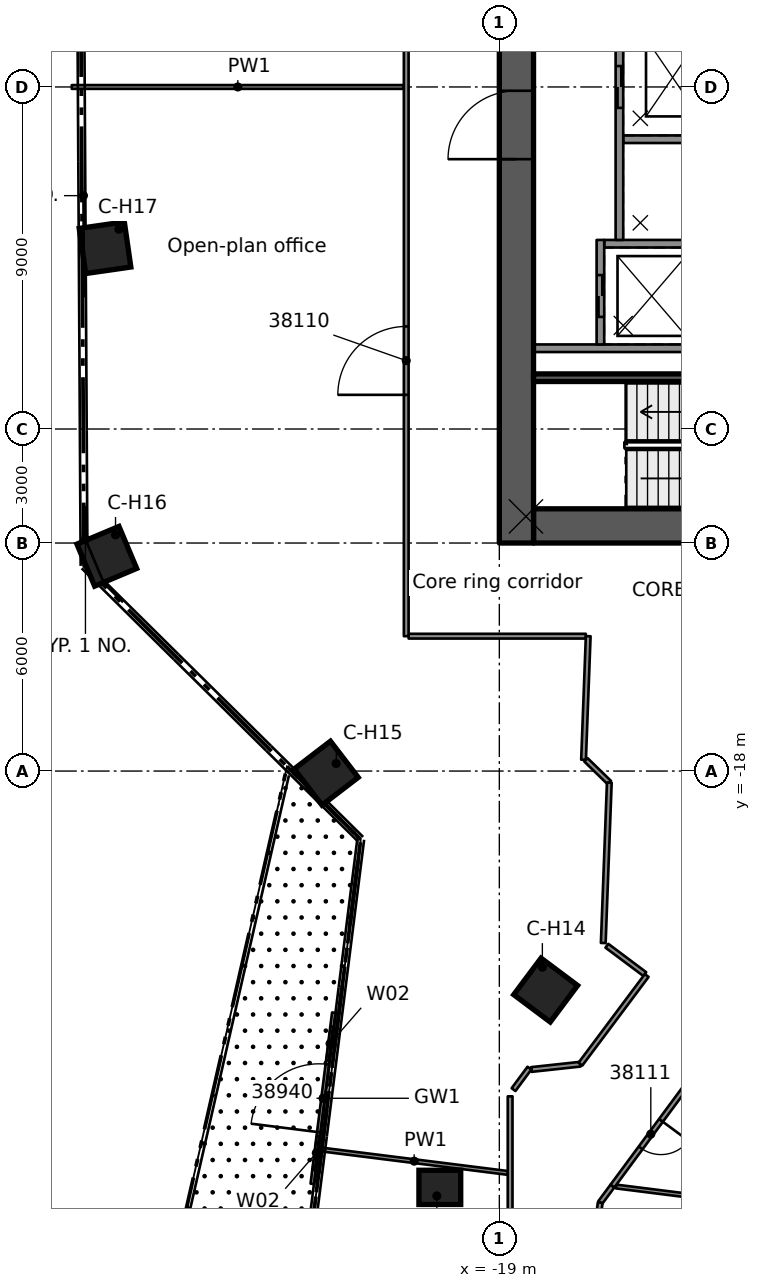
"""IFC4 building model, lengths in metres.
Left out: names, types, materials, properties, quantities, classifications, styles, units other than length and angle.
Written with IfcOpenShell. Run it as: python <this file> out.ifc"""

import sys

from ifc_helpers import new_model, si_unit, direction, frame, frame_2d, origin, origin_2d, place, context, subcontext, project, spatial, rectangle, extrude, element, fill, save


model = new_model("IFC4")
c1 = context("Model", 3, precision=1e-05, world=origin(), true_north=direction((0.0, 1.0)))
c2 = subcontext(c1, "Body", "Model", "MODEL_VIEW")
j1 = project(units=[si_unit("LENGTHUNIT", "METRE"), si_unit("PLANEANGLEUNIT", "RADIAN")], contexts=[c1])
p1 = place(None, origin())
s1 = spatial("IfcSite", under=j1, at=p1, CompositionType="ELEMENT")
p2 = place(p1, origin())
s2 = spatial("IfcBuilding", under=s1, at=p2, CompositionType="ELEMENT")
p3 = place(p2, frame((0.0, 0.0, 188.6)))
s3 = spatial("IfcBuildingStorey", under=s2, at=p3, CompositionType="ELEMENT", Elevation=188.6)
p4 = place(p3, frame((-18.1, -11.55, 0.0), z_axis=(0.0, 0.0, 1.0), x_axis=(1.0, 0.0, 0.0)))
e1 = element("IfcWall", 1, at=p4, inside=s3, PredefinedType="SHEAR", context=c2, shape_type="SweptSolid", body=[
    extrude(rectangle(XDim=9.2, YDim=0.9, at=frame_2d((4.6, 0.0))), origin(), (0.0, 0.0, 1.0), 3.5),
])
p5 = place(p4, frame((5.1, 0.0, 0.0)))
e2 = element("IfcOpeningElement", 2, at=p5, cuts=e1, PredefinedType="OPENING", context=c2, shape_type="SweptSolid", body=[
    extrude(rectangle(XDim=1.1, YDim=2.1, at=frame_2d((0.55, 1.05))), frame((0.0, 0.46, 0.0), z_axis=(0.0, -1.0, 0.0), x_axis=(1.0, 0.0, 0.0)), (0.0, 0.0, 1.0), 0.92),
])
p6 = place(p4, frame((7.53, 0.0, 0.0)))
e3 = element("IfcOpeningElement", 3, at=p6, cuts=e1, PredefinedType="OPENING", context=c2, shape_type="SweptSolid", body=[
    extrude(rectangle(XDim=0.9, YDim=2.1, at=frame_2d((0.45, 1.05))), frame((0.0, 0.46, 0.0), z_axis=(0.0, -1.0, 0.0), x_axis=(1.0, 0.0, 0.0)), (0.0, 0.0, 1.0), 0.92),
])
p7 = place(p3, frame((-18.55, -12.0, 0.0), z_axis=(0.0, 0.0, 1.0), x_axis=(0.0, 1.0, 0.0)))
e4 = element("IfcWall", 4, at=p7, inside=s3, PredefinedType="SHEAR", context=c2, shape_type="SweptSolid", body=[
    extrude(rectangle(XDim=24.0, YDim=0.9, at=frame_2d((12.0, 0.0))), origin(), (0.0, 0.0, 1.0), 3.5),
])
p8 = place(p7, frame((10.1, 0.0, 0.0)))
e5 = element("IfcOpeningElement", 5, at=p8, cuts=e4, PredefinedType="OPENING", context=c2, shape_type="SweptSolid", body=[
    extrude(rectangle(XDim=1.8, YDim=2.1, at=frame_2d((0.9, 1.05))), frame((0.0, 0.46, 0.0), z_axis=(0.0, -1.0, 0.0), x_axis=(1.0, 0.0, 0.0)), (0.0, 0.0, 1.0), 0.92),
])
p9 = place(p3, frame((-20.566, -28.954, 0.0), z_axis=(0.0, 0.0, 1.0), x_axis=(1.0, 0.0, 0.0)))
e6 = element("IfcColumn", 6, at=p9, inside=s3, PredefinedType="COLUMN", context=c2, shape_type="SweptSolid", body=[
    extrude(rectangle(XDim=1.1, YDim=0.9, at=origin_2d()), origin(), (0.0, 0.0, 1.0), 3.5),
])
for number, where, z_axis, x_axis in (
    (7, (-17.781, -23.763, 0.0), (0.0, 0.0, 1.0), (-0.599, -0.801, 0.0)),
    (8, (-23.555, -18.056, 0.0), (0.0, 0.0, 1.0), (-0.794, -0.608, 0.0)),
    (9, (-29.329, -12.349, 0.0), (0.0, 0.0, 1.0), (-0.922, -0.388, 0.0)),
    (10, (-29.376, -4.23, 0.0), (0.0, 0.0, 1.0), (-0.99, -0.143, 0.0)),
):
    element("IfcColumn", number, at=place(p3, frame(where, z_axis=z_axis, x_axis=x_axis)), inside=s3, PredefinedType="COLUMN", context=c2, shape_type="SweptSolid", body=[
        extrude(rectangle(XDim=1.2, YDim=1.2, at=origin_2d()), origin(), (0.0, 0.0, 1.0), 3.5),
    ])
p10 = place(p3, frame((-11.54, -6.875, 0.0), z_axis=(0.0, 0.0, 1.0), x_axis=(-1.0, 0.0, 0.0)))
e11 = element("IfcWall", 11, at=p10, inside=s3, PredefinedType="SOLIDWALL", context=c2, shape_type="SweptSolid", body=[
    extrude(rectangle(XDim=6.56, YDim=0.2, at=frame_2d((3.28, 0.0))), origin(), (0.0, 0.0, 1.0), 3.08),
])
p11 = place(p3, frame((-13.74, -4.125, 0.0), z_axis=(0.0, 0.0, 1.0), x_axis=(-1.0, 0.0, 0.0)))
e12 = element("IfcWall", 12, at=p11, inside=s3, PredefinedType="SOLIDWALL", context=c2, shape_type="SweptSolid", body=[
    extrude(rectangle(XDim=2.5, YDim=0.2, at=frame_2d((1.25, 0.0))), origin(), (0.0, 0.0, 1.0), 3.08),
])
p12 = place(p3, frame((-13.74, -1.375, 0.0), z_axis=(0.0, 0.0, 1.0), x_axis=(-1.0, 0.0, 0.0)))
e13 = element("IfcWall", 13, at=p12, inside=s3, PredefinedType="SOLIDWALL", context=c2, shape_type="SweptSolid", body=[
    extrude(rectangle(XDim=2.0, YDim=0.2, at=frame_2d((1.0, 0.0))), origin(), (0.0, 0.0, 1.0), 3.08),
])
p13 = place(p3, frame((-16.34, -6.775, 0.0), z_axis=(0.0, 0.0, 1.0), x_axis=(0.0, 1.0, 0.0)))
e14 = element("IfcWall", 14, at=p13, inside=s3, PredefinedType="SOLIDWALL", context=c2, shape_type="SweptSolid", body=[
    extrude(rectangle(XDim=2.75, YDim=0.2, at=frame_2d((1.375, 0.0))), origin(), (0.0, 0.0, 1.0), 3.08),
])
p14 = place(p13, frame((0.725, 0.0, 0.0)))
e15 = element("IfcOpeningElement", 15, at=p14, cuts=e14, PredefinedType="OPENING", context=c2, shape_type="SweptSolid", body=[
    extrude(rectangle(XDim=1.1, YDim=2.1, at=frame_2d((0.55, 1.05))), frame((0.0, 0.11, 0.0), z_axis=(0.0, -1.0, 0.0), x_axis=(1.0, 0.0, 0.0)), (0.0, 0.0, 1.0), 0.22),
])
p15 = place(p3, frame((-15.84, -4.025, 0.0), z_axis=(0.0, 0.0, 1.0), x_axis=(0.0, 1.0, 0.0)))
e16 = element("IfcWall", 16, at=p15, inside=s3, PredefinedType="SOLIDWALL", context=c2, shape_type="SweptSolid", body=[
    extrude(rectangle(XDim=8.05, YDim=0.2, at=frame_2d((4.025, 0.0))), origin(), (0.0, 0.0, 1.0), 3.08),
])
p16 = place(p15, frame((3.475, 0.0, 0.0)))
e17 = element("IfcOpeningElement", 17, at=p16, cuts=e16, PredefinedType="OPENING", context=c2, shape_type="SweptSolid", body=[
    extrude(rectangle(XDim=1.1, YDim=2.1, at=frame_2d((0.55, 1.05))), frame((0.0, 0.11, 0.0), z_axis=(0.0, -1.0, 0.0), x_axis=(1.0, 0.0, 0.0)), (0.0, 0.0, 1.0), 0.22),
])
p17 = place(p15, frame((6.225, 0.0, 0.0)))
e18 = element("IfcOpeningElement", 18, at=p17, cuts=e16, PredefinedType="OPENING", context=c2, shape_type="SweptSolid", body=[
    extrude(rectangle(XDim=1.1, YDim=2.1, at=frame_2d((0.55, 1.05))), frame((0.0, 0.11, 0.0), z_axis=(0.0, -1.0, 0.0), x_axis=(1.0, 0.0, 0.0)), (0.0, 0.0, 1.0), 0.22),
])
p18 = place(p3, frame((-11.54, -7.65, 0.0), z_axis=(0.0, 0.0, 1.0), x_axis=(-1.0, 0.0, 0.0)))
e19 = element("IfcWall", 19, at=p18, inside=s3, PredefinedType="SOLIDWALL", context=c2, shape_type="SweptSolid", body=[
    extrude(rectangle(XDim=6.56, YDim=0.2, at=frame_2d((3.28, 0.0))), origin(), (0.0, 0.0, 1.0), 3.08),
])
p19 = place(p3, frame((-23.918, -28.862, 0.0), z_axis=(0.0, 0.0, 1.0), x_axis=(0.124796053311, 0.992182415223, 0.0)))
e20 = element("IfcWall", 20, at=p19, inside=s3, PredefinedType="STANDARD", context=c2, shape_type="SweptSolid", body=[
    extrude(rectangle(XDim=4.539, YDim=0.1, at=frame_2d((2.269, 0.0))), origin(), (0.0, 0.0, 1.0), 3.08),
])
p20 = place(p19, frame((1.37, 0.0, 0.0)))
e21 = element("IfcOpeningElement", 21, at=p20, cuts=e20, PredefinedType="OPENING", context=c2, shape_type="SweptSolid", body=[
    extrude(rectangle(XDim=1.8, YDim=2.4, at=frame_2d((0.9, 1.2))), frame((0.0, 0.06, 0.0), z_axis=(0.0, -1.0, 0.0), x_axis=(1.0, 0.0, 0.0)), (0.0, 0.0, 1.0), 0.12),
])
p21 = place(p19, frame((0.37, 0.0, 0.0)))
e22 = element("IfcOpeningElement", 22, at=p21, cuts=e20, PredefinedType="OPENING", context=c2, shape_type="SweptSolid", body=[
    extrude(rectangle(XDim=0.9, YDim=2.4, at=frame_2d((0.45, 1.2))), frame((0.0, 0.06, 0.0), z_axis=(0.0, -1.0, 0.0), x_axis=(1.0, 0.0, 0.0)), (0.0, 0.0, 1.0), 0.12),
])
p22 = place(p19, frame((3.27, 0.0, 0.0)))
e23 = element("IfcOpeningElement", 23, at=p22, cuts=e20, PredefinedType="OPENING", context=c2, shape_type="SweptSolid", body=[
    extrude(rectangle(XDim=0.9, YDim=2.4, at=frame_2d((0.45, 1.2))), frame((0.0, 0.06, 0.0), z_axis=(0.0, -1.0, 0.0), x_axis=(1.0, 0.0, 0.0)), (0.0, 0.0, 1.0), 0.12),
])
p23 = place(p3, frame((-18.157, -25.853, 0.0), z_axis=(0.0, 0.0, 1.0), x_axis=(0.994151491091, 0.107994503385, 0.0)))
e24 = element("IfcWall", 24, at=p23, inside=s3, PredefinedType="PARTITIONING", context=c2, shape_type="SweptSolid", body=[
    extrude(rectangle(XDim=1.298, YDim=0.125, at=frame_2d((0.649, 0.0))), origin(), (0.0, 0.0, 1.0), 3.06),
])
p24 = place(p3, frame((-16.17, -22.596, 0.0), z_axis=(0.0, 0.0, 1.0), x_axis=(0.800493304829, -0.5993416963, 0.0)))
e25 = element("IfcWall", 25, at=p24, inside=s3, PredefinedType="PARTITIONING", context=c2, shape_type="SweptSolid", body=[
    extrude(rectangle(XDim=1.247, YDim=0.125, at=frame_2d((0.623, 0.0))), origin(), (0.0, 0.0, 1.0), 3.06),
])
p25 = place(p3, frame((-23.703, -27.955, 0.0), z_axis=(0.0, 0.0, 1.0), x_axis=(0.992195935575, -0.124688513617, 0.0)))
e26 = element("IfcWall", 26, at=p25, inside=s3, PredefinedType="PARTITIONING", context=c2, shape_type="SweptSolid", body=[
    extrude(rectangle(XDim=4.964, YDim=0.1, at=frame_2d((2.482, 0.0))), origin(), (0.0, 0.0, 1.0), 3.06),
])
p26 = place(p3, frame((-15.925, -28.932, 0.0), z_axis=(0.0, 0.0, 1.0), x_axis=(0.992178923258, -0.124823812799, 0.0)))
e27 = element("IfcWall", 27, at=p26, inside=s3, PredefinedType="PARTITIONING", context=c2, shape_type="SweptSolid", body=[
    extrude(rectangle(XDim=23.57, YDim=0.1, at=frame_2d((11.785, 0.0))), origin(), (0.0, 0.0, 1.0), 3.06),
])
p27 = place(p3, frame((-16.721, -17.705, 0.0), z_axis=(0.0, 0.0, 1.0), x_axis=(0.716998870517, -0.697074328661, 0.0)))
e28 = element("IfcWall", 28, at=p27, inside=s3, PredefinedType="PARTITIONING", context=c2, shape_type="SweptSolid", body=[
    extrude(rectangle(XDim=0.858, YDim=0.125, at=frame_2d((0.429, 0.0))), origin(), (0.0, 0.0, 1.0), 3.06),
])
p28 = place(p3, frame((-21.387, -14.451, 0.0), z_axis=(0.0, 0.0, 1.0), x_axis=(1.0, 0.0, 0.0)))
e29 = element("IfcWall", 29, at=p28, inside=s3, PredefinedType="PARTITIONING", context=c2, shape_type="SweptSolid", body=[
    extrude(rectangle(XDim=4.663, YDim=0.125, at=frame_2d((2.332, 0.0))), origin(), (0.0, 0.0, 1.0), 3.06),
])
p29 = place(p3, frame((-30.251, 0.0, 0.0), z_axis=(0.0, 0.0, 1.0), x_axis=(1.0, 0.0, 0.0)))
e30 = element("IfcWall", 30, at=p29, inside=s3, PredefinedType="PARTITIONING", context=c2, shape_type="SweptSolid", body=[
    extrude(rectangle(XDim=8.739, YDim=0.1, at=frame_2d((4.37, 0.0))), origin(), (0.0, 0.0, 1.0), 3.06),
])
p30 = place(p3, frame((-16.867, -25.713, 0.0), z_axis=(0.0, 0.0, 1.0), x_axis=(0.598926805965, 0.800803771905, 0.0)))
e31 = element("IfcWall", 31, at=p30, inside=s3, PredefinedType="PARTITIONING", context=c2, shape_type="SweptSolid", body=[
    extrude(rectangle(XDim=2.913, YDim=0.125, at=frame_2d((1.457, 0.0))), origin(), (0.0, 0.0, 1.0), 3.06),
])
p31 = place(p3, frame((-16.345, -29.354, 0.0), z_axis=(0.0, 0.0, 1.0), x_axis=(0.594632608772, 0.803997550111, 0.0)))
e32 = element("IfcWall", 32, at=p31, inside=s3, PredefinedType="PARTITIONING", context=c2, shape_type="SweptSolid", body=[
    extrude(rectangle(XDim=0.54, YDim=0.125, at=frame_2d((0.27, 0.0))), origin(), (0.0, 0.0, 1.0), 3.06),
])
p32 = place(p3, frame((-14.093, -26.307, 0.0), z_axis=(0.0, 0.0, 1.0), x_axis=(-0.594298094146, -0.80424484785, 0.0)))
e33 = element("IfcWall", 33, at=p32, inside=s3, PredefinedType="PARTITIONING", context=c2, shape_type="SweptSolid", body=[
    extrude(rectangle(XDim=3.249, YDim=0.125, at=frame_2d((1.625, 0.0))), origin(), (0.0, 0.0, 1.0), 3.06),
])
p33 = place(p32, frame((1.1, 0.0, 0.0)))
e34 = element("IfcOpeningElement", 34, at=p33, cuts=e33, PredefinedType="OPENING", context=c2, shape_type="SweptSolid", body=[
    extrude(rectangle(XDim=0.9, YDim=2.1, at=frame_2d((0.45, 1.05))), frame((0.0, 0.073, 0.0), z_axis=(0.0, -1.0, 0.0), x_axis=(1.0, 0.0, 0.0)), (0.0, 0.0, 1.0), 0.145),
])
p34 = place(p3, frame((-18.626, -26.382, 0.0), z_axis=(0.0, 0.0, 1.0), x_axis=(0.594596116481, 0.804024538348, 0.0)))
e35 = element("IfcWall", 35, at=p34, inside=s3, PredefinedType="PARTITIONING", context=c2, shape_type="SweptSolid", body=[
    extrude(rectangle(XDim=0.703, YDim=0.125, at=frame_2d((0.352, 0.0))), origin(), (0.0, 0.0, 1.0), 3.06),
])
p35 = place(p3, frame((-16.346, -29.355, 0.0), z_axis=(0.0, 0.0, 1.0), x_axis=(-0.124673942426, -0.992197766617, 0.0)))
e36 = element("IfcWall", 36, at=p35, inside=s3, PredefinedType="PARTITIONING", context=c2, shape_type="SweptSolid", body=[
    extrude(rectangle(XDim=10.435, YDim=0.125, at=frame_2d((5.218, 0.0))), origin(), (0.0, 0.0, 1.0), 3.06),
])
p36 = place(p35, frame((2.099, 0.0, 0.0)))
e37 = element("IfcOpeningElement", 37, at=p36, cuts=e36, PredefinedType="OPENING", context=c2, shape_type="SweptSolid", body=[
    extrude(rectangle(XDim=0.9, YDim=2.1, at=frame_2d((0.45, 1.05))), frame((0.0, 0.073, 0.0), z_axis=(0.0, -1.0, 0.0), x_axis=(1.0, 0.0, 0.0)), (0.0, 0.0, 1.0), 0.145),
])
p37 = place(p3, frame((-16.265, -22.525, 0.0), z_axis=(0.0, 0.0, 1.0), x_axis=(0.037618643473, 0.999292168319, 0.0)))
e38 = element("IfcWall", 38, at=p37, inside=s3, PredefinedType="PARTITIONING", context=c2, shape_type="SweptSolid", body=[
    extrude(rectangle(XDim=4.225, YDim=0.125, at=frame_2d((2.112, 0.0))), origin(), (0.0, 0.0, 1.0), 3.06),
])
p38 = place(p3, frame((-16.784, -17.703, 0.0), z_axis=(0.0, 0.0, 1.0), x_axis=(0.037810780634, 0.999284916762, 0.0)))
e39 = element("IfcWall", 39, at=p38, inside=s3, PredefinedType="PARTITIONING", context=c2, shape_type="SweptSolid", body=[
    extrude(rectangle(XDim=3.254, YDim=0.125, at=frame_2d((1.627, 0.0))), origin(), (0.0, 0.0, 1.0), 3.06),
])
p39 = place(p3, frame((-18.716, -30.237, 0.0), z_axis=(0.0, 0.0, 1.0), x_axis=(0.0, 1.0, 0.0)))
e40 = element("IfcWall", 40, at=p39, inside=s3, PredefinedType="PARTITIONING", context=c2, shape_type="SweptSolid", body=[
    extrude(rectangle(XDim=3.678, YDim=0.125, at=frame_2d((1.839, 0.0))), origin(), (0.0, 0.0, 1.0), 3.06),
])
p40 = place(p3, frame((-21.45, -14.451, 0.0), z_axis=(0.0, 0.0, 1.0), x_axis=(0.0, 1.0, 0.0)))
e41 = element("IfcWall", 41, at=p40, inside=s3, PredefinedType="PARTITIONING", context=c2, shape_type="SweptSolid", body=[
    extrude(rectangle(XDim=28.902, YDim=0.125, at=frame_2d((14.451, 0.0))), origin(), (0.0, 0.0, 1.0), 3.06),
])
p41 = place(p40, frame((6.35, 0.0, 0.0)))
e42 = element("IfcOpeningElement", 42, at=p41, cuts=e41, PredefinedType="OPENING", context=c2, shape_type="SweptSolid", body=[
    extrude(rectangle(XDim=1.8, YDim=2.1, at=frame_2d((0.9, 1.05))), frame((0.0, 0.073, 0.0), z_axis=(0.0, -1.0, 0.0), x_axis=(1.0, 0.0, 0.0)), (0.0, 0.0, 1.0), 0.145),
])
p42 = place(p40, frame((17.551, 0.0, 0.0)))
e43 = element("IfcOpeningElement", 43, at=p42, cuts=e41, PredefinedType="OPENING", context=c2, shape_type="SweptSolid", body=[
    extrude(rectangle(XDim=1.1, YDim=2.1, at=frame_2d((0.55, 1.05))), frame((0.0, 0.073, 0.0), z_axis=(0.0, -1.0, 0.0), x_axis=(1.0, 0.0, 0.0)), (0.0, 0.0, 1.0), 0.145),
])
p43 = place(p14, origin())
e44 = element("IfcDoor", 44, at=p43, inside=s3, OperationType="DOUBLE_DOOR_SLIDING", PredefinedType="DOOR", context=c2, shape_type="SweptSolid", body=[
    extrude(rectangle(XDim=1.1, YDim=2.1, at=frame_2d((0.55, 1.05))), frame((0.0, 0.025, 0.0), z_axis=(0.0, -1.0, 0.0), x_axis=(1.0, 0.0, 0.0)), (0.0, 0.0, 1.0), 0.05),
])
fill(e15, e44)
p44 = place(p16, origin())
e45 = element("IfcDoor", 45, at=p44, inside=s3, OperationType="DOUBLE_DOOR_SLIDING", PredefinedType="DOOR", context=c2, shape_type="SweptSolid", body=[
    extrude(rectangle(XDim=1.1, YDim=2.1, at=frame_2d((0.55, 1.05))), frame((0.0, 0.025, 0.0), z_axis=(0.0, -1.0, 0.0), x_axis=(1.0, 0.0, 0.0)), (0.0, 0.0, 1.0), 0.05),
])
fill(e17, e45)
p45 = place(p8, origin())
e46 = element("IfcDoor", 46, at=p45, inside=s3, OperationType="SINGLE_SWING_LEFT", PredefinedType="DOOR", context=c2, shape_type="SweptSolid", body=[
    extrude(rectangle(XDim=1.8, YDim=2.1, at=frame_2d((0.9, 1.05))), frame((0.0, 0.025, 0.0), z_axis=(0.0, -1.0, 0.0), x_axis=(1.0, 0.0, 0.0)), (0.0, 0.0, 1.0), 0.05),
])
fill(e5, e46)
p46 = place(p20, origin())
e47 = element("IfcDoor", 47, at=p46, inside=s3, OperationType="DOUBLE_DOOR_SINGLE_SWING", PredefinedType="DOOR", context=c2, shape_type="SweptSolid", body=[
    extrude(rectangle(XDim=1.8, YDim=2.4, at=frame_2d((0.9, 1.2))), frame((0.0, 0.025, 0.0), z_axis=(0.0, -1.0, 0.0), x_axis=(1.0, 0.0, 0.0)), (0.0, 0.0, 1.0), 0.05),
])
fill(e21, e47)
p47 = place(p21, origin())
e48 = element("IfcWindow", 48, at=p47, inside=s3, PartitioningType="SINGLE_PANEL", PredefinedType="WINDOW", context=c2, shape_type="SweptSolid", body=[
    extrude(rectangle(XDim=0.9, YDim=2.4, at=frame_2d((0.45, 1.2))), frame((0.0, 0.03, 0.0), z_axis=(0.0, -1.0, 0.0), x_axis=(1.0, 0.0, 0.0)), (0.0, 0.0, 1.0), 0.06),
])
fill(e22, e48)
p48 = place(p22, origin())
e49 = element("IfcWindow", 49, at=p48, inside=s3, PartitioningType="SINGLE_PANEL", PredefinedType="WINDOW", context=c2, shape_type="SweptSolid", body=[
    extrude(rectangle(XDim=0.9, YDim=2.4, at=frame_2d((0.45, 1.2))), frame((0.0, 0.03, 0.0), z_axis=(0.0, -1.0, 0.0), x_axis=(1.0, 0.0, 0.0)), (0.0, 0.0, 1.0), 0.06),
])
fill(e23, e49)
p49 = place(p41, origin())
e50 = element("IfcDoor", 50, at=p49, inside=s3, OperationType="DOUBLE_DOOR_SINGLE_SWING", PredefinedType="DOOR", context=c2, shape_type="SweptSolid", body=[
    extrude(rectangle(XDim=1.8, YDim=2.1, at=frame_2d((0.9, 1.05))), frame((0.0, 0.025, 0.0), z_axis=(0.0, -1.0, 0.0), x_axis=(1.0, 0.0, 0.0)), (0.0, 0.0, 1.0), 0.05),
])
fill(e42, e50)
p50 = place(p33, origin())
e51 = element("IfcDoor", 51, at=p50, inside=s3, OperationType="SINGLE_SWING_LEFT", PredefinedType="DOOR", context=c2, shape_type="SweptSolid", body=[
    extrude(rectangle(XDim=0.9, YDim=2.1, at=frame_2d((0.45, 1.05))), frame((0.0, 0.025, 0.0), z_axis=(0.0, -1.0, 0.0), x_axis=(1.0, 0.0, 0.0)), (0.0, 0.0, 1.0), 0.05),
])
fill(e34, e51)
save(model, sys.argv[1])
